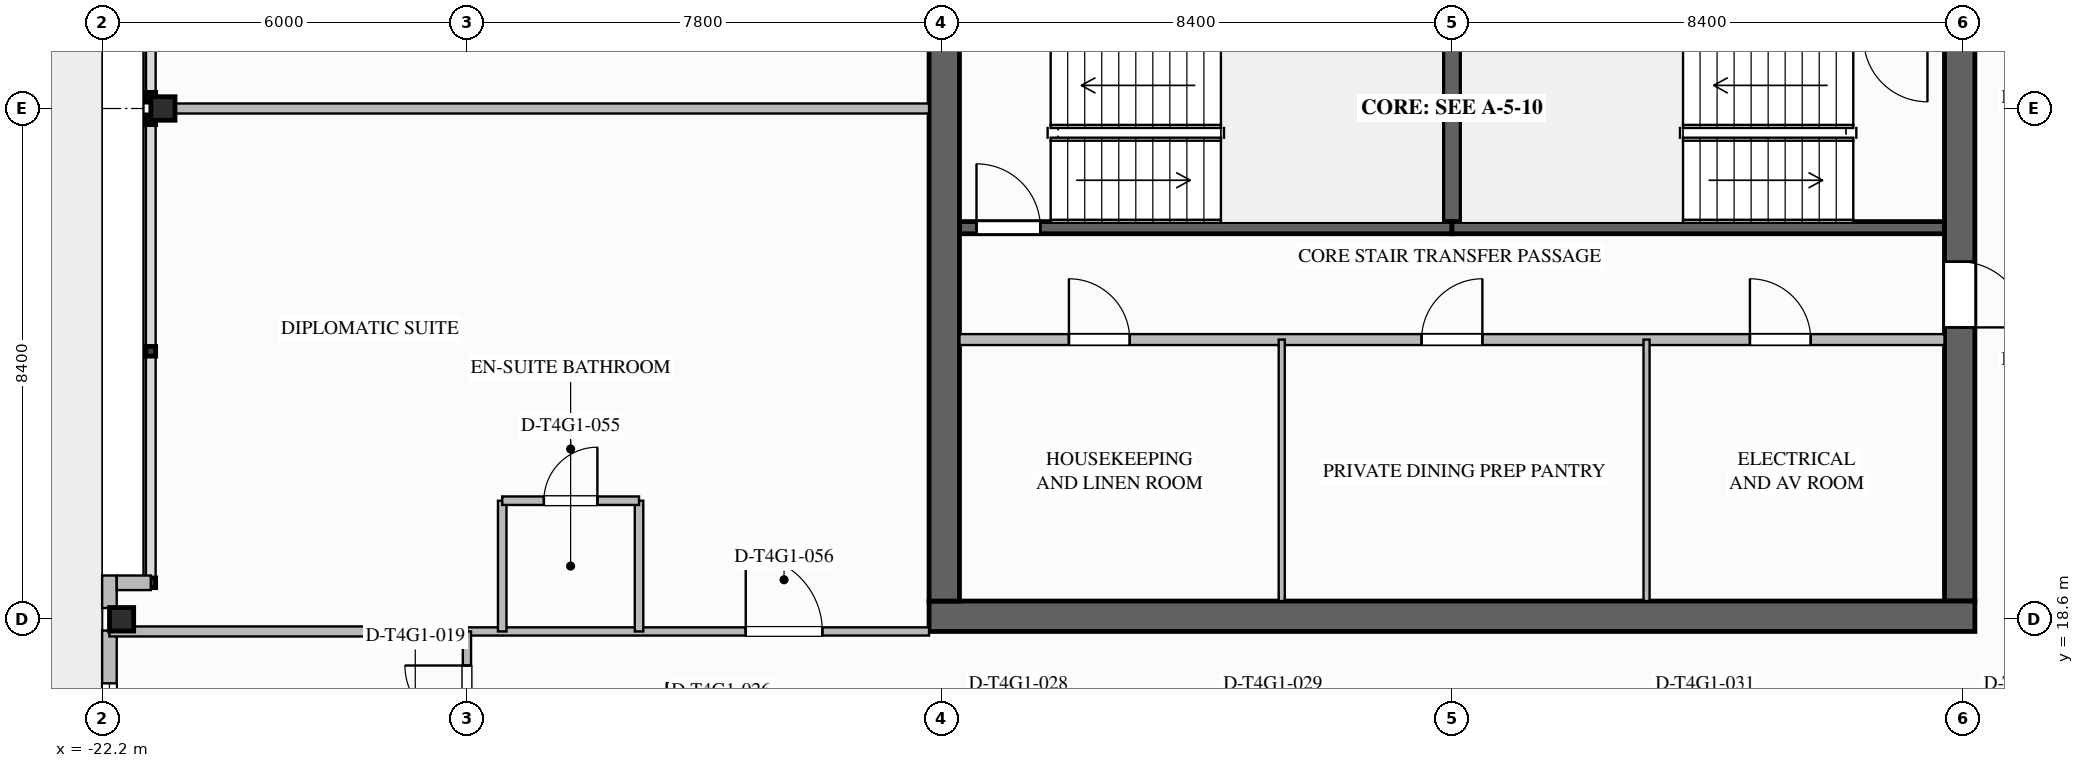
"""IFC4 building model, lengths in metres.
Left out: names, types, materials, properties, quantities, classifications, styles, units other than length and angle.
Written with IfcOpenShell. Run it as: python <this file> out.ifc"""

import sys

from ifc_helpers import new_model, si_unit, direction, frame, frame_2d, origin, origin_2d, place, context, subcontext, project, spatial, rectangle, i_section, extrude, element, fill, save


model = new_model("IFC4")
c1 = context("Model", 3, precision=1e-05, world=origin(), true_north=direction((0.0, 1.0)))
c2 = subcontext(c1, "Body", "Model", "MODEL_VIEW")
j1 = project(units=[si_unit("LENGTHUNIT", "METRE"), si_unit("PLANEANGLEUNIT", "RADIAN")], contexts=[c1])
p1 = place(None, origin())
s1 = spatial("IfcSite", under=j1, at=p1, CompositionType="ELEMENT")
p2 = place(p1, origin())
s2 = spatial("IfcBuilding", under=s1, at=p2, CompositionType="ELEMENT")
p3 = place(p2, frame((0.0, 0.0, 205.1)))
s3 = spatial("IfcBuildingStorey", under=s2, at=p3, CompositionType="ELEMENT", Elevation=205.1)
p4 = place(p3, frame((8.35, 35.1, 0.0), z_axis=(0.0, 0.0, 1.0), x_axis=(0.0, -1.0, 0.0)))
e1 = element("IfcWall", 1, at=p4, inside=s3, PredefinedType="SHEAR", context=c2, shape_type="SweptSolid", body=[
    extrude(rectangle(XDim=16.2, YDim=0.5, at=frame_2d((8.1, 0.0))), origin(), (0.0, 0.0, 1.0), 3.6),
])
p5 = place(p4, frame((3.08, 0.0, 0.0)))
e2 = element("IfcOpeningElement", 2, at=p5, cuts=e1, PredefinedType="OPENING", context=c2, shape_type="SweptSolid", body=[
    extrude(rectangle(XDim=1.12, YDim=2.1, at=frame_2d((0.56, 1.05))), frame((0.0, 0.26, 0.0), z_axis=(0.0, -1.0, 0.0), x_axis=(1.0, 0.0, 0.0)), (0.0, 0.0, 1.0), 0.52),
])
p6 = place(p4, frame((10.62, 0.0, 0.0)))
e3 = element("IfcOpeningElement", 3, at=p6, cuts=e1, PredefinedType="OPENING", context=c2, shape_type="SweptSolid", body=[
    extrude(rectangle(XDim=1.08, YDim=2.04, at=frame_2d((0.54, 1.02))), frame((0.0, 0.26, 0.0), z_axis=(0.0, -1.0, 0.0), x_axis=(1.0, 0.0, 0.0)), (0.0, 0.0, 1.0), 0.52),
])
p7 = place(p3, frame((8.6, 18.65, 0.0), z_axis=(0.0, 0.0, 1.0), x_axis=(-1.0, 0.0, 0.0)))
e4 = element("IfcWall", 4, at=p7, inside=s3, PredefinedType="SHEAR", context=c2, shape_type="SweptSolid", body=[
    extrude(rectangle(XDim=17.2, YDim=0.5, at=frame_2d((8.6, 0.0))), origin(), (0.0, 0.0, 1.0), 3.6),
])
p8 = place(p3, frame((-8.35, 18.9, 0.0), z_axis=(0.0, 0.0, 1.0), x_axis=(0.0, 1.0, 0.0)))
e5 = element("IfcWall", 5, at=p8, inside=s3, PredefinedType="SHEAR", context=c2, shape_type="SweptSolid", body=[
    extrude(rectangle(XDim=16.2, YDim=0.5, at=frame_2d((8.1, 0.0))), origin(), (0.0, 0.0, 1.0), 3.6),
])
for number, where, z_axis, x_axis in (
    (6, (-21.88, 18.6, -0.26), (0.0, 0.0, 1.0), (1.0, 0.0, 0.0)),
    (7, (-21.2, 27.0, -0.26), (0.0, 0.0, 1.0), (1.0, 0.0, 0.0)),
):
    element("IfcColumn", number, at=place(p3, frame(where, z_axis=z_axis, x_axis=x_axis)), inside=s3, PredefinedType="COLUMN", context=c2, shape_type="SweptSolid", body=[
        extrude(i_section(OverallWidth=0.397, OverallDepth=0.387, WebThickness=0.021, FlangeThickness=0.033, FilletRadius=0.025, at=origin_2d()), origin(), (0.0, 0.0, 1.0), 3.857),
    ])
p9 = place(p3, frame((-22.08, 10.985, 0.0), z_axis=(0.0, 0.0, 1.0), x_axis=(0.0, 1.0, 0.0)))
e8 = element("IfcWall", 8, at=p9, inside=s3, PredefinedType="STANDARD", context=c2, shape_type="SweptSolid", body=[
    extrude(rectangle(XDim=7.429, YDim=0.24, at=frame_2d((3.715, 0.0))), origin(), (0.0, 0.0, 1.0), 2.803),
])
p10 = place(p9, frame((3.115, 0.0, 0.0)))
e9 = element("IfcOpeningElement", 9, at=p10, cuts=e8, PredefinedType="OPENING", context=c2, shape_type="SweptSolid", body=[
    extrude(rectangle(XDim=1.0, YDim=2.2, at=frame_2d((0.5, 1.1))), frame((0.0, 0.13, 0.0), z_axis=(0.0, -1.0, 0.0), x_axis=(1.0, 0.0, 0.0)), (0.0, 0.0, 1.0), 0.26),
])
p11 = place(p9, frame((4.761, 0.0, 0.75)))
e10 = element("IfcOpeningElement", 10, at=p11, cuts=e8, PredefinedType="OPENING", context=c2, shape_type="SweptSolid", body=[
    extrude(rectangle(XDim=1.8, YDim=1.953, at=frame_2d((0.9, 0.977))), frame((0.0, 0.13, 0.0), z_axis=(0.0, -1.0, 0.0), x_axis=(1.0, 0.0, 0.0)), (0.0, 0.0, 1.0), 0.26),
])
p12 = place(p3, frame((-22.08, 18.785, 0.0), z_axis=(0.0, 0.0, 1.0), x_axis=(0.0, 1.0, 0.0)))
e11 = element("IfcWall", 11, at=p12, inside=s3, PredefinedType="STANDARD", context=c2, shape_type="SweptSolid", body=[
    extrude(rectangle(XDim=0.535, YDim=0.24, at=frame_2d((0.267, 0.0))), origin(), (0.0, 0.0, 1.0), 3.34),
])
p13 = place(p3, frame((-21.96, 19.2, 0.0), z_axis=(0.0, 0.0, 1.0), x_axis=(1.0, 0.0, 0.0)))
e12 = element("IfcWall", 12, at=p13, inside=s3, PredefinedType="STANDARD", context=c2, shape_type="SweptSolid", body=[
    extrude(rectangle(XDim=0.56, YDim=0.24, at=frame_2d((0.28, 0.0))), origin(), (0.0, 0.0, 1.0), 3.34),
])
p14 = place(p3, frame((0.0, 25.04, 0.0), z_axis=(0.0, 0.0, 1.0), x_axis=(0.0, 1.0, 0.0)))
e13 = element("IfcWall", 13, at=p14, inside=s3, PredefinedType="SOLIDWALL", context=c2, shape_type="SweptSolid", body=[
    extrude(rectangle(XDim=3.12, YDim=0.3, at=frame_2d((1.56, 0.0))), origin(), (0.0, 0.0, 1.0), 3.34),
])
p15 = place(p3, frame((-8.1, 25.04, 0.0), z_axis=(0.0, 0.0, 1.0), x_axis=(1.0, 0.0, 0.0)))
e14 = element("IfcWall", 14, at=p15, inside=s3, PredefinedType="SOLIDWALL", context=c2, shape_type="SweptSolid", body=[
    extrude(rectangle(XDim=8.1, YDim=0.2, at=frame_2d((4.05, 0.0))), origin(), (0.0, 0.0, 1.0), 3.34),
])
p16 = place(p15, frame((0.28, 0.0, 0.0)))
e15 = element("IfcOpeningElement", 15, at=p16, cuts=e14, PredefinedType="OPENING", context=c2, shape_type="SweptSolid", body=[
    extrude(rectangle(XDim=1.05, YDim=2.1, at=frame_2d((0.525, 1.05))), frame((0.0, 0.11, 0.0), z_axis=(0.0, -1.0, 0.0), x_axis=(1.0, 0.0, 0.0)), (0.0, 0.0, 1.0), 0.22),
])
p17 = place(p3, frame((0.0, 25.04, 0.0), z_axis=(0.0, 0.0, 1.0), x_axis=(1.0, 0.0, 0.0)))
e16 = element("IfcWall", 16, at=p17, inside=s3, PredefinedType="SOLIDWALL", context=c2, shape_type="SweptSolid", body=[
    extrude(rectangle(XDim=8.1, YDim=0.2, at=frame_2d((4.05, 0.0))), origin(), (0.0, 0.0, 1.0), 3.34),
])
p18 = place(p3, frame((-8.1, 23.2, 0.0), z_axis=(0.0, 0.0, 1.0), x_axis=(1.0, 0.0, 0.0)))
e17 = element("IfcWall", 17, at=p18, inside=s3, PredefinedType="SOLIDWALL", context=c2, shape_type="SweptSolid", body=[
    extrude(rectangle(XDim=16.2, YDim=0.18, at=frame_2d((8.1, 0.0))), origin(), (0.0, 0.0, 1.0), 3.34),
])
p19 = place(p18, frame((1.8, 0.0, 0.0)))
e18 = element("IfcOpeningElement", 18, at=p19, cuts=e17, PredefinedType="OPENING", context=c2, shape_type="SweptSolid", body=[
    extrude(rectangle(XDim=1.0, YDim=2.1, at=frame_2d((0.5, 1.05))), frame((0.0, 0.1, 0.0), z_axis=(0.0, -1.0, 0.0), x_axis=(1.0, 0.0, 0.0)), (0.0, 0.0, 1.0), 0.2),
])
p20 = place(p18, frame((7.6, 0.0, 0.0)))
e19 = element("IfcOpeningElement", 19, at=p20, cuts=e17, PredefinedType="OPENING", context=c2, shape_type="SweptSolid", body=[
    extrude(rectangle(XDim=1.0, YDim=2.1, at=frame_2d((0.5, 1.05))), frame((0.0, 0.1, 0.0), z_axis=(0.0, -1.0, 0.0), x_axis=(1.0, 0.0, 0.0)), (0.0, 0.0, 1.0), 0.2),
])
p21 = place(p18, frame((13.0, 0.0, 0.0)))
e20 = element("IfcOpeningElement", 20, at=p21, cuts=e17, PredefinedType="OPENING", context=c2, shape_type="SweptSolid", body=[
    extrude(rectangle(XDim=1.0, YDim=2.1, at=frame_2d((0.5, 1.05))), frame((0.0, 0.1, 0.0), z_axis=(0.0, -1.0, 0.0), x_axis=(1.0, 0.0, 0.0)), (0.0, 0.0, 1.0), 0.2),
])
for number, where, z_axis, x_axis in (
    (21, (-2.8, 18.9, 0.0), (0.0, 0.0, 1.0), (0.0, 1.0, 0.0)),
    (22, (3.2, 18.9, 0.0), (0.0, 0.0, 1.0), (0.0, 1.0, 0.0)),
):
    element("IfcWall", number, at=place(p3, frame(where, z_axis=z_axis, x_axis=x_axis)), inside=s3, PredefinedType="PARTITIONING", context=c2, shape_type="SweptSolid", body=[
        extrude(rectangle(XDim=4.3, YDim=0.1, at=frame_2d((2.15, 0.0))), origin(), (0.0, 0.0, 1.0), 3.34),
    ])
p22 = place(p3, frame((-16.2, 18.4, 0.0), z_axis=(0.0, 0.0, 1.0), x_axis=(1.0, 0.0, 0.0)))
e23 = element("IfcWall", 23, at=p22, inside=s3, PredefinedType="PARTITIONING", context=c2, shape_type="SweptSolid", body=[
    extrude(rectangle(XDim=7.6, YDim=0.135, at=frame_2d((3.8, 0.0))), origin(), (0.0, 0.0, 1.0), 2.717),
])
p23 = place(p22, frame((4.585, 0.0, 0.0)))
e24 = element("IfcOpeningElement", 24, at=p23, cuts=e23, PredefinedType="OPENING", context=c2, shape_type="SweptSolid", body=[
    extrude(rectangle(XDim=1.26, YDim=2.2, at=frame_2d((0.63, 1.1))), frame((0.0, 0.077, 0.0), z_axis=(0.0, -1.0, 0.0), x_axis=(1.0, 0.0, 0.0)), (0.0, 0.0, 1.0), 0.155),
])
p24 = place(p3, frame((-16.2, 16.3, 0.0), z_axis=(0.0, 0.0, 1.0), x_axis=(0.0, 1.0, 0.0)))
e25 = element("IfcWall", 25, at=p24, inside=s3, PredefinedType="PARTITIONING", context=c2, shape_type="SweptSolid", body=[
    extrude(rectangle(XDim=2.1, YDim=0.135, at=frame_2d((1.05, 0.0))), origin(), (0.0, 0.0, 1.0), 2.714),
])
p25 = place(p24, frame((0.52, 0.0, 0.0)))
e26 = element("IfcOpeningElement", 26, at=p25, cuts=e25, PredefinedType="OPENING", context=c2, shape_type="SweptSolid", body=[
    extrude(rectangle(XDim=1.02, YDim=2.15, at=frame_2d((0.51, 1.075))), frame((0.0, 0.077, 0.0), z_axis=(0.0, -1.0, 0.0), x_axis=(1.0, 0.0, 0.0)), (0.0, 0.0, 1.0), 0.155),
])
p26 = place(p3, frame((-22.08, 18.4, 0.0), z_axis=(0.0, 0.0, 1.0), x_axis=(1.0, 0.0, 0.0)))
e27 = element("IfcWall", 27, at=p26, inside=s3, PredefinedType="PARTITIONING", context=c2, shape_type="SweptSolid", body=[
    extrude(rectangle(XDim=5.88, YDim=0.165, at=frame_2d((2.94, 0.0))), origin(), (0.0, 0.0, 1.0), 2.714),
])
p27 = place(p3, frame((-21.4, 27.0, 0.0), z_axis=(0.0, 0.0, 1.0), x_axis=(1.0, 0.0, 0.0)))
e28 = element("IfcWall", 28, at=p27, inside=s3, PredefinedType="PARTITIONING", context=c2, shape_type="SweptSolid", body=[
    extrude(rectangle(XDim=12.8, YDim=0.165, at=frame_2d((6.4, 0.0))), origin(), (0.0, 0.0, 1.0), 2.714),
])
for number, where, z_axis, x_axis in (
    (29, (-15.62, 18.4, 0.0), (0.0, 0.0, 1.0), (0.0, 1.0, 0.0)),
    (30, (-13.37, 18.4, 0.0), (0.0, 0.0, 1.0), (0.0, 1.0, 0.0)),
):
    element("IfcWall", number, at=place(p3, frame(where, z_axis=z_axis, x_axis=x_axis)), inside=s3, PredefinedType="PLUMBINGWALL", context=c2, shape_type="SweptSolid", body=[
        extrude(rectangle(XDim=2.15, YDim=0.14, at=frame_2d((1.075, 0.0))), origin(), (0.0, 0.0, 1.0), 3.34),
    ])
p28 = place(p3, frame((-15.62, 20.55, 0.0), z_axis=(0.0, 0.0, 1.0), x_axis=(1.0, 0.0, 0.0)))
e31 = element("IfcWall", 31, at=p28, inside=s3, PredefinedType="PLUMBINGWALL", context=c2, shape_type="SweptSolid", body=[
    extrude(rectangle(XDim=2.25, YDim=0.14, at=frame_2d((1.125, 0.0))), origin(), (0.0, 0.0, 1.0), 3.34),
])
p29 = place(p28, frame((0.685, 0.0, 0.0)))
e32 = element("IfcOpeningElement", 32, at=p29, cuts=e31, PredefinedType="OPENING", context=c2, shape_type="SweptSolid", body=[
    extrude(rectangle(XDim=0.88, YDim=2.1, at=frame_2d((0.44, 1.05))), frame((0.0, 0.08, 0.0), z_axis=(0.0, -1.0, 0.0), x_axis=(1.0, 0.0, 0.0)), (0.0, 0.0, 1.0), 0.16),
])
p30 = place(p11, origin())
e33 = element("IfcWindow", 33, at=p30, inside=s3, PartitioningType="SINGLE_PANEL", PredefinedType="WINDOW", context=c2, shape_type="SweptSolid", body=[
    extrude(rectangle(XDim=1.8, YDim=1.953, at=frame_2d((0.9, 0.977))), frame((0.0, 0.03, 0.0), z_axis=(0.0, -1.0, 0.0), x_axis=(1.0, 0.0, 0.0)), (0.0, 0.0, 1.0), 0.06),
])
fill(e10, e33)
p31 = place(p16, origin())
e34 = element("IfcDoor", 34, at=p31, inside=s3, OperationType="SINGLE_SWING_LEFT", PredefinedType="DOOR", context=c2, shape_type="SweptSolid", body=[
    extrude(rectangle(XDim=1.05, YDim=2.1, at=frame_2d((0.525, 1.05))), frame((0.0, 0.025, 0.0), z_axis=(0.0, -1.0, 0.0), x_axis=(1.0, 0.0, 0.0)), (0.0, 0.0, 1.0), 0.05),
])
fill(e15, e34)
p32 = place(p6, origin())
e35 = element("IfcDoor", 35, at=p32, inside=s3, OperationType="SINGLE_SWING_RIGHT", PredefinedType="DOOR", context=c2, shape_type="SweptSolid", body=[
    extrude(rectangle(XDim=1.08, YDim=2.04, at=frame_2d((0.54, 1.02))), frame((0.0, 0.025, 0.0), z_axis=(0.0, -1.0, 0.0), x_axis=(1.0, 0.0, 0.0)), (0.0, 0.0, 1.0), 0.05),
])
fill(e3, e35)
p33 = place(p19, origin())
e36 = element("IfcDoor", 36, at=p33, inside=s3, OperationType="SINGLE_SWING_LEFT", PredefinedType="DOOR", context=c2, shape_type="SweptSolid", body=[
    extrude(rectangle(XDim=1.0, YDim=2.1, at=frame_2d((0.5, 1.05))), frame((0.0, 0.025, 0.0), z_axis=(0.0, -1.0, 0.0), x_axis=(1.0, 0.0, 0.0)), (0.0, 0.0, 1.0), 0.05),
])
fill(e18, e36)
p34 = place(p20, origin())
e37 = element("IfcDoor", 37, at=p34, inside=s3, OperationType="SINGLE_SWING_RIGHT", PredefinedType="DOOR", context=c2, shape_type="SweptSolid", body=[
    extrude(rectangle(XDim=1.0, YDim=2.1, at=frame_2d((0.5, 1.05))), frame((0.0, 0.025, 0.0), z_axis=(0.0, -1.0, 0.0), x_axis=(1.0, 0.0, 0.0)), (0.0, 0.0, 1.0), 0.05),
])
fill(e19, e37)
p35 = place(p21, origin())
e38 = element("IfcDoor", 38, at=p35, inside=s3, OperationType="SINGLE_SWING_LEFT", PredefinedType="DOOR", context=c2, shape_type="SweptSolid", body=[
    extrude(rectangle(XDim=1.0, YDim=2.1, at=frame_2d((0.5, 1.05))), frame((0.0, 0.025, 0.0), z_axis=(0.0, -1.0, 0.0), x_axis=(1.0, 0.0, 0.0)), (0.0, 0.0, 1.0), 0.05),
])
fill(e20, e38)
p36 = place(p25, origin())
e39 = element("IfcDoor", 39, at=p36, inside=s3, OperationType="SINGLE_SWING_RIGHT", PredefinedType="DOOR", context=c2, shape_type="SweptSolid", body=[
    extrude(rectangle(XDim=1.02, YDim=2.15, at=frame_2d((0.51, 1.075))), frame((0.0, 0.025, 0.0), z_axis=(0.0, -1.0, 0.0), x_axis=(1.0, 0.0, 0.0)), (0.0, 0.0, 1.0), 0.05),
])
fill(e26, e39)
p37 = place(p29, origin())
e40 = element("IfcDoor", 40, at=p37, inside=s3, OperationType="SINGLE_SWING_RIGHT", PredefinedType="DOOR", context=c2, shape_type="SweptSolid", body=[
    extrude(rectangle(XDim=0.88, YDim=2.1, at=frame_2d((0.44, 1.05))), frame((0.0, 0.025, 0.0), z_axis=(0.0, -1.0, 0.0), x_axis=(1.0, 0.0, 0.0)), (0.0, 0.0, 1.0), 0.05),
])
fill(e32, e40)
p38 = place(p23, origin())
e41 = element("IfcDoor", 41, at=p38, inside=s3, OperationType="SINGLE_SWING_LEFT", PredefinedType="DOOR", context=c2, shape_type="SweptSolid", body=[
    extrude(rectangle(XDim=1.26, YDim=2.2, at=frame_2d((0.63, 1.1))), frame((0.0, 0.025, 0.0), z_axis=(0.0, -1.0, 0.0), x_axis=(1.0, 0.0, 0.0)), (0.0, 0.0, 1.0), 0.05),
])
fill(e24, e41)
save(model, sys.argv[1])
